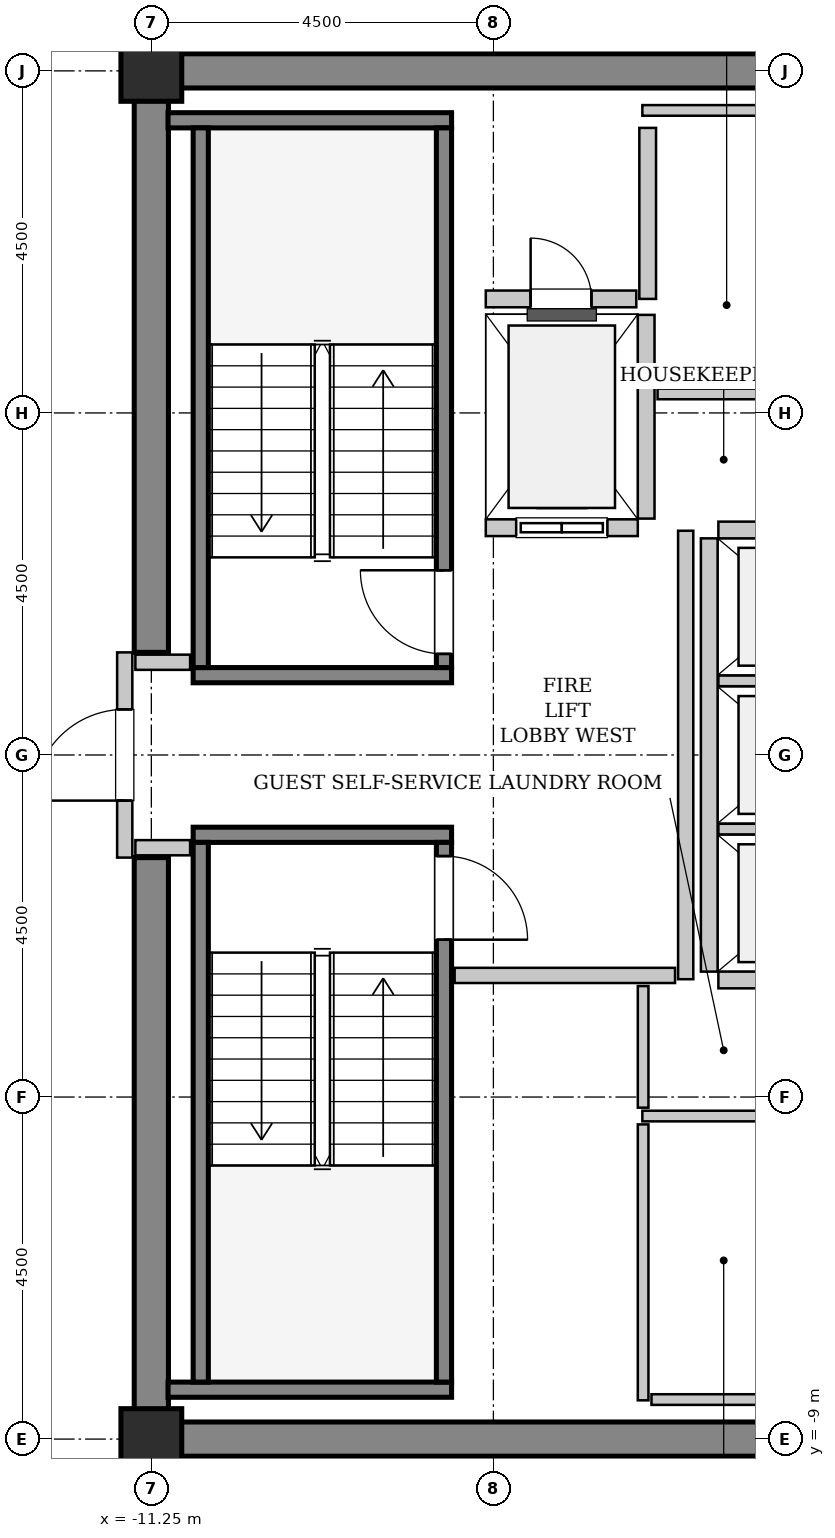
"""IFC4 building model, lengths in metres.
Left out: names, types, materials, properties, quantities, classifications, styles, units other than length and angle.
Written with IfcOpenShell. Run it as: python <this file> out.ifc"""

import sys

from ifc_helpers import new_model, si_unit, direction, frame, frame_2d, origin, origin_2d, place, context, subcontext, project, spatial, rectangle, hollow_rectangle, extrude, source, transform, mapped, element, fill, save


model = new_model("IFC4")
c1 = context("Model", 3, precision=1e-05, world=origin(), true_north=direction((0.0, 1.0)))
c2 = subcontext(c1, "Body", "Model", "MODEL_VIEW")
j1 = project(units=[si_unit("LENGTHUNIT", "METRE"), si_unit("PLANEANGLEUNIT", "RADIAN")], contexts=[c1])
p1 = place(None, origin())
s1 = spatial("IfcSite", under=j1, at=p1, CompositionType="ELEMENT")
p2 = place(p1, origin())
s2 = spatial("IfcBuilding", under=s1, at=p2, CompositionType="ELEMENT")
p3 = place(p2, frame((0.0, 0.0, 295.0)))
s3 = spatial("IfcBuildingStorey", under=s2, at=p3, CompositionType="ELEMENT", Elevation=295.0)
m1 = source(origin(), c2, "Body", "SweptSolid", [
    extrude(rectangle(XDim=9.925, YDim=0.45, at=frame_2d((4.962, 0.0))), origin(), (0.0, 0.0, 1.0), 3.8),
])
for number, where, z_axis, x_axis in (
    (1, (-11.475, 9.0, 0.0), (0.0, 0.0, 1.0), (1.0, 0.0, 0.0)),
    (2, (-11.475, -9.0, 0.0), (0.0, 0.0, 1.0), (1.0, 0.0, 0.0)),
):
    element("IfcWall", number, at=place(p3, frame(where, z_axis=z_axis, x_axis=x_axis)), inside=s3, PredefinedType="SHEAR", context=c2, shape_type="MappedRepresentation", body=[
        mapped(m1, transform((0.0, 0.0, 0.0), x_axis=(1.0, 0.0, 0.0), y_axis=(0.0, 1.0, 0.0), z_axis=(0.0, 0.0, 1.0), scale=1.0)),
    ])
m2 = source(origin(), c2, "Body", "SweptSolid", [
    extrude(rectangle(XDim=7.425, YDim=0.45, at=frame_2d((3.712, 0.0))), origin(), (0.0, 0.0, 1.0), 3.8),
])
for number, where, z_axis, x_axis in (
    (3, (-11.25, -8.775, 0.0), (0.0, 0.0, 1.0), (0.0, 1.0, 0.0)),
    (4, (-11.25, 1.35, 0.0), (0.0, 0.0, 1.0), (0.0, 1.0, 0.0)),
):
    element("IfcWall", number, at=place(p3, frame(where, z_axis=z_axis, x_axis=x_axis)), inside=s3, PredefinedType="SHEAR", context=c2, shape_type="MappedRepresentation", body=[
        mapped(m2, transform((0.0, 0.0, 0.0), x_axis=(1.0, 0.0, 0.0), y_axis=(0.0, 1.0, 0.0), z_axis=(0.0, 0.0, 1.0), scale=1.0)),
    ])
m3 = source(origin(), c2, "Body", "SweptSolid", [
    extrude(hollow_rectangle(XDim=0.8, YDim=0.8, WallThickness=0.04, InnerFilletRadius=0.04, OuterFilletRadius=0.08, at=origin_2d()), origin(), (0.0, 0.0, 1.0), 3.8),
])
for number, where, z_axis, x_axis in (
    (5, (-11.25, -9.0, 0.0), (0.0, 0.0, 1.0), (1.0, 0.0, 0.0)),
    (6, (-11.25, 9.0, 0.0), (0.0, 0.0, 1.0), (1.0, 0.0, 0.0)),
):
    element("IfcColumn", number, at=place(p3, frame(where, z_axis=z_axis, x_axis=x_axis)), inside=s3, PredefinedType="COLUMN", context=c2, shape_type="MappedRepresentation", body=[
        mapped(m3, transform((0.0, 0.0, 0.0), x_axis=(1.0, 0.0, 0.0), y_axis=(0.0, 1.0, 0.0), z_axis=(0.0, 0.0, 1.0), scale=1.0)),
    ])
m4 = source(origin(), c2, "Body", "SweptSolid", [
    extrude(rectangle(XDim=3.4, YDim=0.2, at=frame_2d((1.7, 0.0))), origin(), (0.0, 0.0, 1.0), 3.8),
])
p4 = place(p3, frame((-7.3, 1.05, 0.0), z_axis=(0.0, 0.0, 1.0), x_axis=(-1.0, 0.0, 0.0)))
e7 = element("IfcWall", 7, at=p4, inside=s3, PredefinedType="SOLIDWALL", context=c2, shape_type="MappedRepresentation", body=[
    mapped(m4, transform((0.0, 0.0, 0.0), x_axis=(1.0, 0.0, 0.0), y_axis=(0.0, 1.0, 0.0), z_axis=(0.0, 0.0, 1.0), scale=1.0)),
])
m5 = source(origin(), c2, "Body", "SweptSolid", [
    extrude(rectangle(XDim=3.73, YDim=0.2, at=frame_2d((1.865, 0.0))), origin(), (0.0, 0.0, 1.0), 3.8),
])
p5 = place(p3, frame((-7.3, 8.35, 0.0), z_axis=(0.0, 0.0, 1.0), x_axis=(-1.0, 0.0, 0.0)))
e8 = element("IfcWall", 8, at=p5, inside=s3, PredefinedType="SOLIDWALL", context=c2, shape_type="MappedRepresentation", body=[
    mapped(m5, transform((0.0, 0.0, 0.0), x_axis=(1.0, 0.0, 0.0), y_axis=(0.0, 1.0, 0.0), z_axis=(0.0, 0.0, 1.0), scale=1.0)),
])
m6 = source(origin(), c2, "Body", "SweptSolid", [
    extrude(rectangle(XDim=7.1, YDim=0.2, at=frame_2d((3.55, 0.0))), origin(), (0.0, 0.0, 1.0), 3.8),
])
p6 = place(p3, frame((-7.4, 1.15, 0.0), z_axis=(0.0, 0.0, 1.0), x_axis=(0.0, 1.0, 0.0)))
e9 = element("IfcWall", 9, at=p6, inside=s3, PredefinedType="SOLIDWALL", context=c2, shape_type="MappedRepresentation", body=[
    mapped(m6, transform((0.0, 0.0, 0.0), x_axis=(1.0, 0.0, 0.0), y_axis=(0.0, 1.0, 0.0), z_axis=(0.0, 0.0, 1.0), scale=1.0)),
])
p7 = place(p6, frame((0.18, 0.0, 0.0)))
e10 = element("IfcOpeningElement", 10, at=p7, cuts=e9, PredefinedType="OPENING", context=c2, shape_type="SweptSolid", body=[
    extrude(rectangle(XDim=1.1, YDim=2.15, at=frame_2d((0.55, 1.075))), frame((0.0, 0.11, 0.0), z_axis=(0.0, -1.0, 0.0), x_axis=(1.0, 0.0, 0.0)), (0.0, 0.0, 1.0), 0.22),
])
p8 = place(p3, frame((-10.6, 1.15, 0.0), z_axis=(0.0, 0.0, 1.0), x_axis=(0.0, 1.0, 0.0)))
e11 = element("IfcWall", 11, at=p8, inside=s3, PredefinedType="SOLIDWALL", context=c2, shape_type="MappedRepresentation", body=[
    mapped(m6, transform((0.0, 0.0, 0.0), x_axis=(1.0, 0.0, 0.0), y_axis=(0.0, 1.0, 0.0), z_axis=(0.0, 0.0, 1.0), scale=1.0)),
])
p9 = place(p3, frame((-10.7, -1.05, 0.0), z_axis=(0.0, 0.0, 1.0), x_axis=(1.0, 0.0, 0.0)))
e12 = element("IfcWall", 12, at=p9, inside=s3, PredefinedType="SOLIDWALL", context=c2, shape_type="MappedRepresentation", body=[
    mapped(m4, transform((0.0, 0.0, 0.0), x_axis=(1.0, 0.0, 0.0), y_axis=(0.0, 1.0, 0.0), z_axis=(0.0, 0.0, 1.0), scale=1.0)),
])
p10 = place(p3, frame((-11.03, -8.35, 0.0), z_axis=(0.0, 0.0, 1.0), x_axis=(1.0, 0.0, 0.0)))
e13 = element("IfcWall", 13, at=p10, inside=s3, PredefinedType="SOLIDWALL", context=c2, shape_type="MappedRepresentation", body=[
    mapped(m5, transform((0.0, 0.0, 0.0), x_axis=(1.0, 0.0, 0.0), y_axis=(0.0, 1.0, 0.0), z_axis=(0.0, 0.0, 1.0), scale=1.0)),
])
p11 = place(p3, frame((-10.6, -1.15, 0.0), z_axis=(0.0, 0.0, 1.0), x_axis=(0.0, -1.0, 0.0)))
e14 = element("IfcWall", 14, at=p11, inside=s3, PredefinedType="SOLIDWALL", context=c2, shape_type="MappedRepresentation", body=[
    mapped(m6, transform((0.0, 0.0, 0.0), x_axis=(1.0, 0.0, 0.0), y_axis=(0.0, 1.0, 0.0), z_axis=(0.0, 0.0, 1.0), scale=1.0)),
])
p12 = place(p3, frame((-7.4, -1.15, 0.0), z_axis=(0.0, 0.0, 1.0), x_axis=(0.0, -1.0, 0.0)))
e15 = element("IfcWall", 15, at=p12, inside=s3, PredefinedType="SOLIDWALL", context=c2, shape_type="MappedRepresentation", body=[
    mapped(m6, transform((0.0, 0.0, 0.0), x_axis=(1.0, 0.0, 0.0), y_axis=(0.0, 1.0, 0.0), z_axis=(0.0, 0.0, 1.0), scale=1.0)),
])
p13 = place(p12, frame((0.18, 0.0, 0.0)))
e16 = element("IfcOpeningElement", 16, at=p13, cuts=e15, PredefinedType="OPENING", context=c2, shape_type="SweptSolid", body=[
    extrude(rectangle(XDim=1.1, YDim=2.15, at=frame_2d((0.55, 1.075))), frame((0.0, 0.11, 0.0), z_axis=(0.0, -1.0, 0.0), x_axis=(1.0, 0.0, 0.0)), (0.0, 0.0, 1.0), 0.22),
])
m7 = source(origin(), c2, "Body", "SweptSolid", [
    extrude(rectangle(XDim=2.0, YDim=0.22, at=frame_2d((1.0, 0.0))), origin(), (0.0, 0.0, 1.0), 3.535),
])
p14 = place(p3, frame((-6.85, 2.99, 0.0), z_axis=(0.0, 0.0, 1.0), x_axis=(1.0, 0.0, 0.0)))
e17 = element("IfcWall", 17, at=p14, inside=s3, PredefinedType="SOLIDWALL", context=c2, shape_type="MappedRepresentation", body=[
    mapped(m7, transform((0.0, 0.0, 0.0), x_axis=(1.0, 0.0, 0.0), y_axis=(0.0, 1.0, 0.0), z_axis=(0.0, 0.0, 1.0), scale=1.0)),
])
p15 = place(p14, frame((0.4, 0.0, 0.0)))
e18 = element("IfcOpeningElement", 18, at=p15, cuts=e17, PredefinedType="OPENING", context=c2, shape_type="SweptSolid", body=[
    extrude(rectangle(XDim=1.2, YDim=2.2, at=frame_2d((0.6, 1.1))), frame((0.0, 0.12, 0.0), z_axis=(0.0, -1.0, 0.0), x_axis=(1.0, 0.0, 0.0)), (0.0, 0.0, 1.0), 0.24),
])
m8 = source(origin(), c2, "Body", "SweptSolid", [
    extrude(rectangle(XDim=2.68, YDim=0.22, at=frame_2d((1.34, 0.0))), origin(), (0.0, 0.0, 1.0), 3.535),
])
p16 = place(p3, frame((-4.74, 3.11, 0.0), z_axis=(0.0, 0.0, 1.0), x_axis=(0.0, 1.0, 0.0)))
e19 = element("IfcWall", 19, at=p16, inside=s3, PredefinedType="SOLIDWALL", context=c2, shape_type="MappedRepresentation", body=[
    mapped(m8, transform((0.0, 0.0, 0.0), x_axis=(1.0, 0.0, 0.0), y_axis=(0.0, 1.0, 0.0), z_axis=(0.0, 0.0, 1.0), scale=1.0)),
])
m9 = source(origin(), c2, "Body", "SweptSolid", [
    extrude(rectangle(XDim=5.7, YDim=0.22, at=frame_2d((2.85, 0.0))), origin(), (0.0, 0.0, 1.0), 3.535),
])
p17 = place(p3, frame((-3.91, 2.85, 0.0), z_axis=(0.0, 0.0, 1.0), x_axis=(0.0, -1.0, 0.0)))
e20 = element("IfcWall", 20, at=p17, inside=s3, PredefinedType="SOLIDWALL", context=c2, shape_type="MappedRepresentation", body=[
    mapped(m9, transform((0.0, 0.0, 0.0), x_axis=(1.0, 0.0, 0.0), y_axis=(0.0, 1.0, 0.0), z_axis=(0.0, 0.0, 1.0), scale=1.0)),
])
m10 = source(origin(), c2, "Body", "SweptSolid", [
    extrude(rectangle(XDim=2.13, YDim=0.22, at=frame_2d((1.065, 0.0))), origin(), (0.0, 0.0, 1.0), 3.535),
])
p18 = place(p3, frame((-3.79, -2.96, 0.0), z_axis=(0.0, 0.0, 1.0), x_axis=(1.0, 0.0, 0.0)))
e21 = element("IfcWall", 21, at=p18, inside=s3, PredefinedType="SOLIDWALL", context=c2, shape_type="MappedRepresentation", body=[
    mapped(m10, transform((0.0, 0.0, 0.0), x_axis=(1.0, 0.0, 0.0), y_axis=(0.0, 1.0, 0.0), z_axis=(0.0, 0.0, 1.0), scale=1.0)),
])
m11 = source(origin(), c2, "Body", "SweptSolid", [
    extrude(rectangle(XDim=2.13, YDim=0.14, at=frame_2d((1.065, 0.0))), origin(), (0.0, 0.0, 1.0), 3.535),
])
for number, where, z_axis, x_axis in (
    (22, (-3.79, -0.975, 0.0), (0.0, 0.0, 1.0), (1.0, 0.0, 0.0)),
    (23, (-3.79, 0.975, 0.0), (0.0, 0.0, 1.0), (1.0, 0.0, 0.0)),
):
    element("IfcWall", number, at=place(p3, frame(where, z_axis=z_axis, x_axis=x_axis)), inside=s3, PredefinedType="PARTITIONING", context=c2, shape_type="MappedRepresentation", body=[
        mapped(m11, transform((0.0, 0.0, 0.0), x_axis=(1.0, 0.0, 0.0), y_axis=(0.0, 1.0, 0.0), z_axis=(0.0, 0.0, 1.0), scale=1.0)),
    ])
p19 = place(p3, frame((-1.66, 2.96, 0.0), z_axis=(0.0, 0.0, 1.0), x_axis=(-1.0, 0.0, 0.0)))
e24 = element("IfcWall", 24, at=p19, inside=s3, PredefinedType="SOLIDWALL", context=c2, shape_type="MappedRepresentation", body=[
    mapped(m10, transform((0.0, 0.0, 0.0), x_axis=(1.0, 0.0, 0.0), y_axis=(0.0, 1.0, 0.0), z_axis=(0.0, 0.0, 1.0), scale=1.0)),
])
m12 = source(origin(), c2, "Body", "SweptSolid", [
    extrude(rectangle(XDim=2.25, YDim=0.22, at=frame_2d((1.125, 0.0))), origin(), (0.0, 0.0, 1.0), 3.535),
])
p20 = place(p3, frame((-4.72, 6.0, 0.0), z_axis=(0.0, 0.0, 1.0), x_axis=(0.0, 1.0, 0.0)))
e25 = element("IfcWall", 25, at=p20, inside=s3, PredefinedType="SOLIDWALL", context=c2, shape_type="MappedRepresentation", body=[
    mapped(m12, transform((0.0, 0.0, 0.0), x_axis=(1.0, 0.0, 0.0), y_axis=(0.0, 1.0, 0.0), z_axis=(0.0, 0.0, 1.0), scale=1.0)),
])
m13 = source(origin(), c2, "Body", "SweptSolid", [
    extrude(rectangle(XDim=1.98, YDim=0.22, at=frame_2d((0.99, 0.0))), origin(), (0.0, 0.0, 1.0), 3.535),
])
p21 = place(p3, frame((-6.85, 6.0, 0.0), z_axis=(0.0, 0.0, 1.0), x_axis=(1.0, 0.0, 0.0)))
e26 = element("IfcWall", 26, at=p21, inside=s3, PredefinedType="SOLIDWALL", context=c2, shape_type="MappedRepresentation", body=[
    mapped(m13, transform((0.0, 0.0, 0.0), x_axis=(1.0, 0.0, 0.0), y_axis=(0.0, 1.0, 0.0), z_axis=(0.0, 0.0, 1.0), scale=1.0)),
])
p22 = place(p21, frame((0.59, 0.0, 0.0)))
e27 = element("IfcOpeningElement", 27, at=p22, cuts=e26, PredefinedType="OPENING", context=c2, shape_type="SweptSolid", body=[
    extrude(rectangle(XDim=0.8, YDim=2.0, at=frame_2d((0.4, 1.0))), frame((0.0, 0.12, 0.0), z_axis=(0.0, -1.0, 0.0), x_axis=(1.0, 0.0, 0.0)), (0.0, 0.0, 1.0), 0.24),
])
m14 = source(origin(), c2, "Body", "SweptSolid", [
    extrude(rectangle(XDim=2.7, YDim=0.2, at=frame_2d((1.35, 0.0))), origin(), (0.0, 0.0, 1.0), 2.625),
])
p23 = place(p3, frame((-11.6, -1.35, 0.0), z_axis=(0.0, 0.0, 1.0), x_axis=(0.0, 1.0, 0.0)))
e28 = element("IfcWall", 28, at=p23, inside=s3, PredefinedType="PARTITIONING", context=c2, shape_type="MappedRepresentation", body=[
    mapped(m14, transform((0.0, 0.0, 0.0), x_axis=(1.0, 0.0, 0.0), y_axis=(0.0, 1.0, 0.0), z_axis=(0.0, 0.0, 1.0), scale=1.0)),
])
p24 = place(p23, frame((0.75, 0.0, 0.0)))
e29 = element("IfcOpeningElement", 29, at=p24, cuts=e28, PredefinedType="OPENING", context=c2, shape_type="SweptSolid", body=[
    extrude(rectangle(XDim=1.2, YDim=2.15, at=frame_2d((0.6, 1.075))), frame((0.0, 0.11, 0.0), z_axis=(0.0, -1.0, 0.0), x_axis=(1.0, 0.0, 0.0)), (0.0, 0.0, 1.0), 0.22),
])
m15 = source(origin(), c2, "Body", "SweptSolid", [
    extrude(rectangle(XDim=5.9, YDim=0.2, at=frame_2d((2.95, 0.0))), origin(), (0.0, 0.0, 1.0), 3.535),
])
p25 = place(p3, frame((-4.22, -2.95, 0.0), z_axis=(0.0, 0.0, 1.0), x_axis=(0.0, 1.0, 0.0)))
e30 = element("IfcWall", 30, at=p25, inside=s3, PredefinedType="PARTITIONING", context=c2, shape_type="MappedRepresentation", body=[
    mapped(m15, transform((0.0, 0.0, 0.0), x_axis=(1.0, 0.0, 0.0), y_axis=(0.0, 1.0, 0.0), z_axis=(0.0, 0.0, 1.0), scale=1.0)),
])
m16 = source(origin(), c2, "Body", "SweptSolid", [
    extrude(rectangle(XDim=2.9, YDim=0.2, at=frame_2d((1.45, 0.0))), origin(), (0.0, 0.0, 1.0), 3.535),
])
p26 = place(p3, frame((-7.26, -2.9, 0.0), z_axis=(0.0, 0.0, 1.0), x_axis=(1.0, 0.0, 0.0)))
e31 = element("IfcWall", 31, at=p26, inside=s3, PredefinedType="PARTITIONING", context=c2, shape_type="MappedRepresentation", body=[
    mapped(m16, transform((0.0, 0.0, 0.0), x_axis=(1.0, 0.0, 0.0), y_axis=(0.0, 1.0, 0.0), z_axis=(0.0, 0.0, 1.0), scale=1.0)),
])
m17 = source(origin(), c2, "Body", "SweptSolid", [
    extrude(rectangle(XDim=0.72, YDim=0.2, at=frame_2d((0.36, 0.0))), origin(), (0.0, 0.0, 1.0), 3.535),
])
for number, where, z_axis, x_axis in (
    (32, (-11.46, 1.22, 0.0), (0.0, 0.0, 1.0), (1.0, 0.0, 0.0)),
    (33, (-11.46, -1.22, 0.0), (0.0, 0.0, 1.0), (1.0, 0.0, 0.0)),
):
    element("IfcWall", number, at=place(p3, frame(where, z_axis=z_axis, x_axis=x_axis)), inside=s3, PredefinedType="PARTITIONING", context=c2, shape_type="MappedRepresentation", body=[
        mapped(m17, transform((0.0, 0.0, 0.0), x_axis=(1.0, 0.0, 0.0), y_axis=(0.0, 1.0, 0.0), z_axis=(0.0, 0.0, 1.0), scale=1.0)),
    ])
m18 = source(origin(), c2, "Body", "SweptSolid", [
    extrude(rectangle(XDim=2.95, YDim=0.14, at=frame_2d((1.475, 0.0))), origin(), (0.0, 0.0, 1.0), 3.535),
])
p27 = place(p3, frame((-4.59, 4.75, 0.0), z_axis=(0.0, 0.0, 1.0), x_axis=(1.0, 0.0, 0.0)))
e34 = element("IfcWall", 34, at=p27, inside=s3, PredefinedType="PARTITIONING", context=c2, shape_type="MappedRepresentation", body=[
    mapped(m18, transform((0.0, 0.0, 0.0), x_axis=(1.0, 0.0, 0.0), y_axis=(0.0, 1.0, 0.0), z_axis=(0.0, 0.0, 1.0), scale=1.0)),
])
m19 = source(origin(), c2, "Body", "SweptSolid", [
    extrude(rectangle(XDim=3.15, YDim=0.14, at=frame_2d((1.575, 0.0))), origin(), (0.0, 0.0, 1.0), 3.535),
])
for number, where, z_axis, x_axis in (
    (35, (-4.79, 8.48, 0.0), (0.0, 0.0, 1.0), (1.0, 0.0, 0.0)),
    (36, (-4.79, -4.75, 0.0), (0.0, 0.0, 1.0), (1.0, 0.0, 0.0)),
):
    element("IfcWall", number, at=place(p3, frame(where, z_axis=z_axis, x_axis=x_axis)), inside=s3, PredefinedType="PARTITIONING", context=c2, shape_type="MappedRepresentation", body=[
        mapped(m19, transform((0.0, 0.0, 0.0), x_axis=(1.0, 0.0, 0.0), y_axis=(0.0, 1.0, 0.0), z_axis=(0.0, 0.0, 1.0), scale=1.0)),
    ])
m20 = source(origin(), c2, "Body", "SweptSolid", [
    extrude(rectangle(XDim=1.6, YDim=0.14, at=frame_2d((0.8, 0.0))), origin(), (0.0, 0.0, 1.0), 3.535),
])
p28 = place(p3, frame((-4.78, -4.64, 0.0), z_axis=(0.0, 0.0, 1.0), x_axis=(0.0, 1.0, 0.0)))
e37 = element("IfcWall", 37, at=p28, inside=s3, PredefinedType="PARTITIONING", context=c2, shape_type="MappedRepresentation", body=[
    mapped(m20, transform((0.0, 0.0, 0.0), x_axis=(1.0, 0.0, 0.0), y_axis=(0.0, 1.0, 0.0), z_axis=(0.0, 0.0, 1.0), scale=1.0)),
])
m21 = source(origin(), c2, "Body", "SweptSolid", [
    extrude(rectangle(XDim=3.63, YDim=0.14, at=frame_2d((1.815, 0.0))), origin(), (0.0, 0.0, 1.0), 3.535),
])
p29 = place(p3, frame((-4.78, -8.49, 0.0), z_axis=(0.0, 0.0, 1.0), x_axis=(0.0, 1.0, 0.0)))
e38 = element("IfcWall", 38, at=p29, inside=s3, PredefinedType="PARTITIONING", context=c2, shape_type="MappedRepresentation", body=[
    mapped(m21, transform((0.0, 0.0, 0.0), x_axis=(1.0, 0.0, 0.0), y_axis=(0.0, 1.0, 0.0), z_axis=(0.0, 0.0, 1.0), scale=1.0)),
])
m22 = source(origin(), c2, "Body", "SweptSolid", [
    extrude(rectangle(XDim=3.03, YDim=0.14, at=frame_2d((1.515, 0.0))), origin(), (0.0, 0.0, 1.0), 3.535),
])
p30 = place(p3, frame((-4.67, -8.48, 0.0), z_axis=(0.0, 0.0, 1.0), x_axis=(1.0, 0.0, 0.0)))
e39 = element("IfcWall", 39, at=p30, inside=s3, PredefinedType="PARTITIONING", context=c2, shape_type="MappedRepresentation", body=[
    mapped(m22, transform((0.0, 0.0, 0.0), x_axis=(1.0, 0.0, 0.0), y_axis=(0.0, 1.0, 0.0), z_axis=(0.0, 0.0, 1.0), scale=1.0)),
])
m23 = source(origin(), c2, "Body", "SweptSolid", [
    extrude(rectangle(XDim=1.1, YDim=2.15, at=frame_2d((0.55, 1.075))), frame((0.0, 0.025, 0.0), z_axis=(0.0, -1.0, 0.0), x_axis=(1.0, 0.0, 0.0)), (0.0, 0.0, 1.0), 0.05),
])
p31 = place(p7, origin())
e40 = element("IfcDoor", 40, at=p31, inside=s3, OperationType="SINGLE_SWING_RIGHT", PredefinedType="DOOR", context=c2, shape_type="MappedRepresentation", body=[
    mapped(m23, transform((0.0, 0.0, 0.0), x_axis=(1.0, 0.0, 0.0), y_axis=(0.0, 1.0, 0.0), z_axis=(0.0, 0.0, 1.0), scale=1.0)),
])
fill(e10, e40)
p32 = place(p13, origin())
e41 = element("IfcDoor", 41, at=p32, inside=s3, OperationType="SINGLE_SWING_RIGHT", PredefinedType="DOOR", context=c2, shape_type="MappedRepresentation", body=[
    mapped(m23, transform((0.0, 0.0, 0.0), x_axis=(1.0, 0.0, 0.0), y_axis=(0.0, 1.0, 0.0), z_axis=(0.0, 0.0, 1.0), scale=1.0)),
])
fill(e16, e41)
m24 = source(origin(), c2, "Body", "SweptSolid", [
    extrude(rectangle(XDim=1.2, YDim=2.2, at=frame_2d((0.6, 1.1))), frame((0.0, 0.025, 0.0), z_axis=(0.0, -1.0, 0.0), x_axis=(1.0, 0.0, 0.0)), (0.0, 0.0, 1.0), 0.05),
])
p33 = place(p15, origin())
e42 = element("IfcDoor", 42, at=p33, inside=s3, OperationType="SLIDING_TO_LEFT", PredefinedType="DOOR", context=c2, shape_type="MappedRepresentation", body=[
    mapped(m24, transform((0.0, 0.0, 0.0), x_axis=(1.0, 0.0, 0.0), y_axis=(0.0, 1.0, 0.0), z_axis=(0.0, 0.0, 1.0), scale=1.0)),
])
fill(e18, e42)
m25 = source(origin(), c2, "Body", "SweptSolid", [
    extrude(rectangle(XDim=0.8, YDim=2.0, at=frame_2d((0.4, 1.0))), frame((0.0, 0.025, 0.0), z_axis=(0.0, -1.0, 0.0), x_axis=(1.0, 0.0, 0.0)), (0.0, 0.0, 1.0), 0.05),
])
p34 = place(p22, origin())
e43 = element("IfcDoor", 43, at=p34, inside=s3, OperationType="SINGLE_SWING_LEFT", PredefinedType="TRAPDOOR", context=c2, shape_type="MappedRepresentation", body=[
    mapped(m25, transform((0.0, 0.0, 0.0), x_axis=(1.0, 0.0, 0.0), y_axis=(0.0, 1.0, 0.0), z_axis=(0.0, 0.0, 1.0), scale=1.0)),
])
fill(e27, e43)
m26 = source(origin(), c2, "Body", "SweptSolid", [
    extrude(rectangle(XDim=1.2, YDim=2.15, at=frame_2d((0.6, 1.075))), frame((0.0, 0.025, 0.0), z_axis=(0.0, -1.0, 0.0), x_axis=(1.0, 0.0, 0.0)), (0.0, 0.0, 1.0), 0.05),
])
p35 = place(p24, origin())
e44 = element("IfcDoor", 44, at=p35, inside=s3, OperationType="SINGLE_SWING_LEFT", PredefinedType="DOOR", context=c2, shape_type="MappedRepresentation", body=[
    mapped(m26, transform((0.0, 0.0, 0.0), x_axis=(1.0, 0.0, 0.0), y_axis=(0.0, 1.0, 0.0), z_axis=(0.0, 0.0, 1.0), scale=1.0)),
])
fill(e29, e44)
save(model, sys.argv[1])
